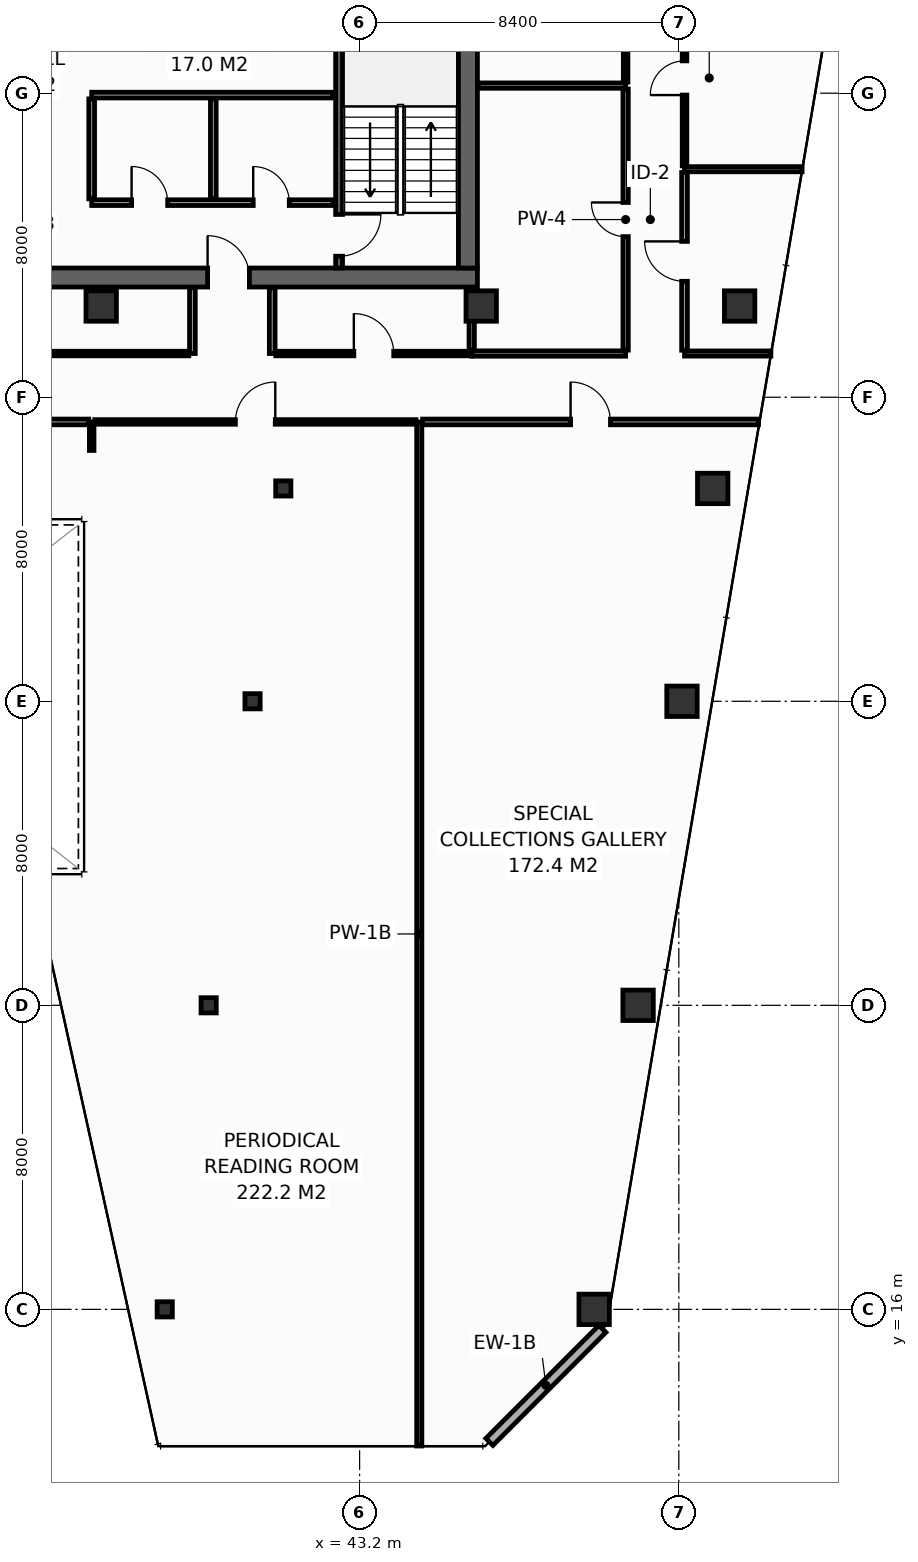
"""IFC4 building model, lengths in metres.
Left out: names, types, materials, properties, quantities, classifications, styles, units other than length and angle.
Written with IfcOpenShell. Run it as: python <this file> out.ifc"""

import sys

from ifc_helpers import new_model, si_unit, direction, frame, frame_2d, origin, origin_2d, place, context, subcontext, project, spatial, rectangle, hollow_rectangle, extrude, element, fill, save


model = new_model("IFC4")
c1 = context("Model", 3, precision=1e-05, world=origin(), true_north=direction((0.0, 1.0)))
c2 = subcontext(c1, "Body", "Model", "MODEL_VIEW")
j1 = project(units=[si_unit("LENGTHUNIT", "METRE"), si_unit("PLANEANGLEUNIT", "RADIAN")], contexts=[c1])
p1 = place(None, origin())
s1 = spatial("IfcSite", under=j1, at=p1, CompositionType="ELEMENT")
p2 = place(p1, origin())
s2 = spatial("IfcBuilding", under=s1, at=p2, CompositionType="ELEMENT")
p3 = place(p2, frame((0.0, 0.0, 194.2)))
s3 = spatial("IfcBuildingStorey", under=s2, at=p3, CompositionType="ELEMENT", Elevation=194.2)
p4 = place(p3, frame((13.6, 43.15, 0.0), z_axis=(0.0, 0.0, 1.0), x_axis=(1.0, 0.0, 0.0)))
e1 = element("IfcWall", 1, at=p4, inside=s3, PredefinedType="SHEAR", context=c2, shape_type="SweptSolid", body=[
    extrude(rectangle(XDim=32.7, YDim=0.5, at=frame_2d((16.35, 0.0))), origin(), (0.0, 0.0, 1.0), 3.55),
])
p5 = place(p4, frame((5.4, 0.0, 0.0)))
e2 = element("IfcOpeningElement", 2, at=p5, cuts=e1, PredefinedType="OPENING", context=c2, shape_type="SweptSolid", body=[
    extrude(rectangle(XDim=1.1, YDim=2.15, at=frame_2d((0.55, 1.075))), frame((0.0, 0.26, 0.0), z_axis=(0.0, -1.0, 0.0), x_axis=(1.0, 0.0, 0.0)), (0.0, 0.0, 1.0), 0.52),
])
p6 = place(p4, frame((25.6, 0.0, 0.0)))
e3 = element("IfcOpeningElement", 3, at=p6, cuts=e1, PredefinedType="OPENING", context=c2, shape_type="SweptSolid", body=[
    extrude(rectangle(XDim=1.1, YDim=2.15, at=frame_2d((0.55, 1.075))), frame((0.0, 0.26, 0.0), z_axis=(0.0, -1.0, 0.0), x_axis=(1.0, 0.0, 0.0)), (0.0, 0.0, 1.0), 0.52),
])
p7 = place(p3, frame((46.05, 43.4, 0.0), z_axis=(0.0, 0.0, 1.0), x_axis=(0.0, 1.0, 0.0)))
e4 = element("IfcWall", 4, at=p7, inside=s3, PredefinedType="SHEAR", context=c2, shape_type="SweptSolid", body=[
    extrude(rectangle(XDim=10.4, YDim=0.5, at=frame_2d((5.2, 0.0))), origin(), (0.0, 0.0, 1.0), 3.55),
])
for number, where, z_axis, x_axis in (
    (5, (36.4, 42.4, 0.0), (0.0, 0.0, 1.0), (1.0, 0.0, 0.0)),
    (6, (46.4, 42.4, 0.0), (0.0, 0.0, 1.0), (1.0, 0.0, 0.0)),
    (7, (53.2, 42.4, 0.0), (0.0, 0.0, 1.0), (1.0, 0.0, 0.0)),
    (8, (49.372, 16.0, 0.0), (0.0, 0.0, 1.0), (1.0, 0.0, 0.0)),
):
    element("IfcColumn", number, at=place(p3, frame(where, z_axis=z_axis, x_axis=x_axis)), inside=s3, PredefinedType="COLUMN", context=c2, shape_type="SweptSolid", body=[
        extrude(hollow_rectangle(XDim=0.8, YDim=0.8, WallThickness=0.036, at=origin_2d()), origin(), (0.0, 0.0, 1.0), 3.8),
    ])
p8 = place(p3, frame((38.072, 16.0, 0.0), z_axis=(0.0, 0.0, 1.0), x_axis=(1.0, 0.0, 0.0)))
e9 = element("IfcColumn", 9, at=p8, inside=s3, PredefinedType="COLUMN", context=c2, shape_type="SweptSolid", body=[
    extrude(hollow_rectangle(XDim=0.4, YDim=0.4, WallThickness=0.016, at=origin_2d()), origin(), (0.0, 0.0, 1.0), 3.8),
])
p9 = place(p3, frame((50.528, 24.0, 0.0), z_axis=(0.0, 0.0, 1.0), x_axis=(1.0, 0.0, 0.0)))
e10 = element("IfcColumn", 10, at=p9, inside=s3, PredefinedType="COLUMN", context=c2, shape_type="SweptSolid", body=[
    extrude(hollow_rectangle(XDim=0.8, YDim=0.8, WallThickness=0.036, at=origin_2d()), origin(), (0.0, 0.0, 1.0), 3.8),
])
p10 = place(p3, frame((39.228, 24.0, 0.0), z_axis=(0.0, 0.0, 1.0), x_axis=(1.0, 0.0, 0.0)))
e11 = element("IfcColumn", 11, at=p10, inside=s3, PredefinedType="COLUMN", context=c2, shape_type="SweptSolid", body=[
    extrude(hollow_rectangle(XDim=0.4, YDim=0.4, WallThickness=0.016, at=origin_2d()), origin(), (0.0, 0.0, 1.0), 3.8),
])
p11 = place(p3, frame((51.683, 32.0, 0.0), z_axis=(0.0, 0.0, 1.0), x_axis=(1.0, 0.0, 0.0)))
e12 = element("IfcColumn", 12, at=p11, inside=s3, PredefinedType="COLUMN", context=c2, shape_type="SweptSolid", body=[
    extrude(hollow_rectangle(XDim=0.8, YDim=0.8, WallThickness=0.036, at=origin_2d()), origin(), (0.0, 0.0, 1.0), 3.8),
])
p12 = place(p3, frame((40.383, 32.0, 0.0), z_axis=(0.0, 0.0, 1.0), x_axis=(1.0, 0.0, 0.0)))
e13 = element("IfcColumn", 13, at=p12, inside=s3, PredefinedType="COLUMN", context=c2, shape_type="SweptSolid", body=[
    extrude(hollow_rectangle(XDim=0.4, YDim=0.4, WallThickness=0.016, at=origin_2d()), origin(), (0.0, 0.0, 1.0), 3.8),
])
p13 = place(p3, frame((52.492, 37.6, 0.0), z_axis=(0.0, 0.0, 1.0), x_axis=(1.0, 0.0, 0.0)))
e14 = element("IfcColumn", 14, at=p13, inside=s3, PredefinedType="COLUMN", context=c2, shape_type="SweptSolid", body=[
    extrude(hollow_rectangle(XDim=0.8, YDim=0.8, WallThickness=0.036, at=origin_2d()), origin(), (0.0, 0.0, 1.0), 3.8),
])
p14 = place(p3, frame((41.192, 37.6, 0.0), z_axis=(0.0, 0.0, 1.0), x_axis=(1.0, 0.0, 0.0)))
e15 = element("IfcColumn", 15, at=p14, inside=s3, PredefinedType="COLUMN", context=c2, shape_type="SweptSolid", body=[
    extrude(hollow_rectangle(XDim=0.4, YDim=0.4, WallThickness=0.016, at=origin_2d()), origin(), (0.0, 0.0, 1.0), 3.8),
])
p15 = place(p3, frame((42.66, 53.8, 0.0), z_axis=(0.0, 0.0, 1.0), x_axis=(0.0, -1.0, 0.0)))
e16 = element("IfcWall", 16, at=p15, inside=s3, PredefinedType="SHEAR", context=c2, shape_type="SweptSolid", body=[
    extrude(rectangle(XDim=10.4, YDim=0.18, at=frame_2d((5.2, 0.0))), origin(), (0.0, 0.0, 1.0), 3.55),
])
p16 = place(p15, frame((8.99, 0.0, 0.0)))
e17 = element("IfcOpeningElement", 17, at=p16, cuts=e16, PredefinedType="OPENING", context=c2, shape_type="SweptSolid", body=[
    extrude(rectangle(XDim=1.1, YDim=2.15, at=frame_2d((0.55, 1.075))), frame((0.0, 0.1, 0.0), z_axis=(0.0, -1.0, 0.0), x_axis=(1.0, 0.0, 0.0)), (0.0, 0.0, 1.0), 0.2),
])
p17 = place(p3, frame((36.15, 45.12, 0.0), z_axis=(0.0, 0.0, 1.0), x_axis=(1.0, 0.0, 0.0)))
e18 = element("IfcWall", 18, at=p17, inside=s3, PredefinedType="PARTITIONING", context=c2, shape_type="SweptSolid", body=[
    extrude(rectangle(XDim=6.35, YDim=0.15, at=frame_2d((3.175, 0.0))), origin(), (0.0, 0.0, 1.0), 3.55),
])
p18 = place(p17, frame((1.05, 0.0, 0.0)))
e19 = element("IfcOpeningElement", 19, at=p18, cuts=e18, PredefinedType="OPENING", context=c2, shape_type="SweptSolid", body=[
    extrude(rectangle(XDim=0.95, YDim=2.15, at=frame_2d((0.475, 1.075))), frame((0.0, 0.085, 0.0), z_axis=(0.0, -1.0, 0.0), x_axis=(1.0, 0.0, 0.0)), (0.0, 0.0, 1.0), 0.17),
])
p19 = place(p17, frame((4.25, 0.0, 0.0)))
e20 = element("IfcOpeningElement", 20, at=p19, cuts=e18, PredefinedType="OPENING", context=c2, shape_type="SweptSolid", body=[
    extrude(rectangle(XDim=0.95, YDim=2.15, at=frame_2d((0.475, 1.075))), frame((0.0, 0.085, 0.0), z_axis=(0.0, -1.0, 0.0), x_axis=(1.0, 0.0, 0.0)), (0.0, 0.0, 1.0), 0.17),
])
p20 = place(p3, frame((36.15, 47.95, 0.0), z_axis=(0.0, 0.0, 1.0), x_axis=(1.0, 0.0, 0.0)))
e21 = element("IfcWall", 21, at=p20, inside=s3, PredefinedType="PARTITIONING", context=c2, shape_type="SweptSolid", body=[
    extrude(rectangle(XDim=6.35, YDim=0.15, at=frame_2d((3.175, 0.0))), origin(), (0.0, 0.0, 1.0), 3.55),
])
for number, where, z_axis, x_axis in (
    (22, (36.15, 45.22, 0.0), (0.0, 0.0, 1.0), (0.0, 1.0, 0.0)),
    (23, (39.35, 45.22, 0.0), (0.0, 0.0, 1.0), (0.0, 1.0, 0.0)),
):
    element("IfcWall", number, at=place(p3, frame(where, z_axis=z_axis, x_axis=x_axis)), inside=s3, PredefinedType="PARTITIONING", context=c2, shape_type="SweptSolid", body=[
        extrude(rectangle(XDim=2.63, YDim=0.15, at=frame_2d((1.315, 0.0))), origin(), (0.0, 0.0, 1.0), 3.55),
    ])
p21 = place(p3, frame((46.615, 12.513, 0.0), z_axis=(0.0, 0.0, 1.0), x_axis=(0.707135806771, 0.70707775441, 0.0)))
e24 = element("IfcWall", 24, at=p21, inside=s3, PredefinedType="STANDARD", context=c2, shape_type="SweptSolid", body=[
    extrude(rectangle(XDim=4.206, YDim=0.26, at=frame_2d((2.103, 0.0))), origin(), (0.0, 0.0, 1.0), 3.55),
])
p22 = place(p3, frame((46.15, 41.15, 0.0), z_axis=(0.0, 0.0, 1.0), x_axis=(1.0, 0.0, 0.0)))
e25 = element("IfcWall", 25, at=p22, inside=s3, PredefinedType="PARTITIONING", context=c2, shape_type="SweptSolid", body=[
    extrude(rectangle(XDim=4.05, YDim=0.14, at=frame_2d((2.025, 0.0))), origin(), (0.0, 0.0, 1.0), 3.55),
])
p23 = place(p3, frame((46.15, 41.24, 0.0), z_axis=(0.0, 0.0, 1.0), x_axis=(0.0, 1.0, 0.0)))
e26 = element("IfcWall", 26, at=p23, inside=s3, PredefinedType="PARTITIONING", context=c2, shape_type="SweptSolid", body=[
    extrude(rectangle(XDim=1.64, YDim=0.14, at=frame_2d((0.82, 0.0))), origin(), (0.0, 0.0, 1.0), 3.55),
])
p24 = place(p3, frame((46.32, 48.2, 0.0), z_axis=(0.0, 0.0, 1.0), x_axis=(1.0, 0.0, 0.0)))
e27 = element("IfcWall", 27, at=p24, inside=s3, PredefinedType="PARTITIONING", context=c2, shape_type="SweptSolid", body=[
    extrude(rectangle(XDim=3.88, YDim=0.14, at=frame_2d((1.94, 0.0))), origin(), (0.0, 0.0, 1.0), 3.55),
])
p25 = place(p3, frame((50.2, 41.24, 0.0), z_axis=(0.0, 0.0, 1.0), x_axis=(0.0, 1.0, 0.0)))
e28 = element("IfcWall", 28, at=p25, inside=s3, PredefinedType="PARTITIONING", context=c2, shape_type="SweptSolid", body=[
    extrude(rectangle(XDim=6.87, YDim=0.14, at=frame_2d((3.435, 0.0))), origin(), (0.0, 0.0, 1.0), 2.835),
])
p26 = place(p25, frame((2.985, 0.0, 0.0)))
e29 = element("IfcOpeningElement", 29, at=p26, cuts=e28, PredefinedType="OPENING", context=c2, shape_type="SweptSolid", body=[
    extrude(rectangle(XDim=0.9, YDim=2.1, at=frame_2d((0.45, 1.05))), frame((0.0, 0.08, 0.0), z_axis=(0.0, -1.0, 0.0), x_axis=(1.0, 0.0, 0.0)), (0.0, 0.0, 1.0), 0.16),
])
p27 = place(p3, frame((50.2, 48.29, 0.0), z_axis=(0.0, 0.0, 1.0), x_axis=(0.0, 1.0, 0.0)))
e30 = element("IfcWall", 30, at=p27, inside=s3, PredefinedType="PARTITIONING", context=c2, shape_type="SweptSolid", body=[
    extrude(rectangle(XDim=3.98, YDim=0.12, at=frame_2d((1.99, 0.0))), origin(), (0.0, 0.0, 1.0), 3.55),
])
p28 = place(p27, frame((1.465, 0.0, 0.0)))
e31 = element("IfcOpeningElement", 31, at=p28, cuts=e30, PredefinedType="OPENING", context=c2, shape_type="SweptSolid", body=[
    extrude(rectangle(XDim=1.05, YDim=2.15, at=frame_2d((0.525, 1.075))), frame((0.0, 0.07, 0.0), z_axis=(0.0, -1.0, 0.0), x_axis=(1.0, 0.0, 0.0)), (0.0, 0.0, 1.0), 0.14),
])
p29 = place(p3, frame((51.75, 41.15, 0.0), z_axis=(0.0, 0.0, 1.0), x_axis=(1.0, 0.0, 0.0)))
e32 = element("IfcWall", 32, at=p29, inside=s3, PredefinedType="PARTITIONING", context=c2, shape_type="SweptSolid", body=[
    extrude(rectangle(XDim=2.273, YDim=0.135, at=frame_2d((1.136, 0.0))), origin(), (0.0, 0.0, 1.0), 3.035),
])
p30 = place(p3, frame((51.75, 46.0, 0.0), z_axis=(0.0, 0.0, 1.0), x_axis=(1.0, 0.0, 0.0)))
e33 = element("IfcWall", 33, at=p30, inside=s3, PredefinedType="PARTITIONING", context=c2, shape_type="SweptSolid", body=[
    extrude(rectangle(XDim=3.094, YDim=0.135, at=frame_2d((1.547, 0.0))), origin(), (0.0, 0.0, 1.0), 2.835),
])
p31 = place(p3, frame((51.75, 41.238, 0.0), z_axis=(0.0, 0.0, 1.0), x_axis=(0.0, 1.0, 0.0)))
e34 = element("IfcWall", 34, at=p31, inside=s3, PredefinedType="PARTITIONING", context=c2, shape_type="SweptSolid", body=[
    extrude(rectangle(XDim=4.675, YDim=0.15, at=frame_2d((2.337, 0.0))), origin(), (0.0, 0.0, 1.0), 2.835),
])
p32 = place(p31, frame((1.813, 0.0, 0.0)))
e35 = element("IfcOpeningElement", 35, at=p32, cuts=e34, PredefinedType="OPENING", context=c2, shape_type="SweptSolid", body=[
    extrude(rectangle(XDim=1.05, YDim=2.15, at=frame_2d((0.525, 1.075))), frame((0.0, 0.085, 0.0), z_axis=(0.0, -1.0, 0.0), x_axis=(1.0, 0.0, 0.0)), (0.0, 0.0, 1.0), 0.17),
])
p33 = place(p3, frame((51.75, 46.087, 0.0), z_axis=(0.0, 0.0, 1.0), x_axis=(0.0, 1.0, 0.0)))
e36 = element("IfcWall", 36, at=p33, inside=s3, PredefinedType="PARTITIONING", context=c2, shape_type="SweptSolid", body=[
    extrude(rectangle(XDim=4.625, YDim=0.12, at=frame_2d((2.312, 0.0))), origin(), (0.0, 0.0, 1.0), 3.55),
])
p34 = place(p33, frame((1.863, 0.0, 0.0)))
e37 = element("IfcOpeningElement", 37, at=p34, cuts=e36, PredefinedType="OPENING", context=c2, shape_type="SweptSolid", body=[
    extrude(rectangle(XDim=0.9, YDim=2.1, at=frame_2d((0.45, 1.05))), frame((0.0, 0.07, 0.0), z_axis=(0.0, -1.0, 0.0), x_axis=(1.0, 0.0, 0.0)), (0.0, 0.0, 1.0), 0.14),
])
for number, where, z_axis, x_axis in (
    (38, (38.8, 41.15, 0.0), (0.0, 0.0, 1.0), (0.0, 1.0, 0.0)),
    (39, (40.9, 41.15, 0.0), (0.0, 0.0, 1.0), (0.0, 1.0, 0.0)),
):
    element("IfcWall", number, at=place(p3, frame(where, z_axis=z_axis, x_axis=x_axis)), inside=s3, PredefinedType="PARTITIONING", context=c2, shape_type="SweptSolid", body=[
        extrude(rectangle(XDim=1.73, YDim=0.15, at=frame_2d((0.865, 0.0))), origin(), (0.0, 0.0, 1.0), 3.55),
    ])
p35 = place(p3, frame((20.795, 41.15, 0.0), z_axis=(0.0, 0.0, 1.0), x_axis=(1.0, 0.0, 0.0)))
e40 = element("IfcWall", 40, at=p35, inside=s3, PredefinedType="PARTITIONING", context=c2, shape_type="SweptSolid", body=[
    extrude(rectangle(XDim=17.91, YDim=0.12, at=frame_2d((8.955, 0.0))), origin(), (0.0, 0.0, 1.0), 2.835),
])
p36 = place(p35, frame((8.43, 0.0, 0.0)))
e41 = element("IfcOpeningElement", 41, at=p36, cuts=e40, PredefinedType="OPENING", context=c2, shape_type="SweptSolid", body=[
    extrude(rectangle(XDim=1.05, YDim=2.15, at=frame_2d((0.525, 1.075))), frame((0.0, 0.07, 0.0), z_axis=(0.0, -1.0, 0.0), x_axis=(1.0, 0.0, 0.0)), (0.0, 0.0, 1.0), 0.14),
])
p37 = place(p3, frame((40.995, 41.15, 0.0), z_axis=(0.0, 0.0, 1.0), x_axis=(1.0, 0.0, 0.0)))
e42 = element("IfcWall", 42, at=p37, inside=s3, PredefinedType="PARTITIONING", context=c2, shape_type="SweptSolid", body=[
    extrude(rectangle(XDim=5.155, YDim=0.12, at=frame_2d((2.577, 0.0))), origin(), (0.0, 0.0, 1.0), 3.55),
])
p38 = place(p37, frame((2.053, 0.0, 0.0)))
e43 = element("IfcOpeningElement", 43, at=p38, cuts=e42, PredefinedType="OPENING", context=c2, shape_type="SweptSolid", body=[
    extrude(rectangle(XDim=1.05, YDim=2.15, at=frame_2d((0.525, 1.075))), frame((0.0, 0.07, 0.0), z_axis=(0.0, -1.0, 0.0), x_axis=(1.0, 0.0, 0.0)), (0.0, 0.0, 1.0), 0.14),
])
p39 = place(p3, frame((44.77, 12.405, 0.0), z_axis=(0.0, 0.0, 1.0), x_axis=(0.0, 1.0, 0.0)))
e44 = element("IfcWall", 44, at=p39, inside=s3, PredefinedType="PARTITIONING", context=c2, shape_type="SweptSolid", body=[
    extrude(rectangle(XDim=26.945, YDim=0.135, at=frame_2d((13.473, 0.0))), origin(), (0.0, 0.0, 1.0), 2.835),
])
p40 = place(p3, frame((36.15, 38.6, 0.0), z_axis=(0.0, 0.0, 1.0), x_axis=(0.0, 1.0, 0.0)))
e45 = element("IfcWall", 45, at=p40, inside=s3, PredefinedType="PARTITIONING", context=c2, shape_type="SweptSolid", body=[
    extrude(rectangle(XDim=0.75, YDim=0.12, at=frame_2d((0.375, 0.0))), origin(), (0.0, 0.0, 1.0), 3.55),
])
p41 = place(p3, frame((23.93, 39.35, 0.0), z_axis=(0.0, 0.0, 1.0), x_axis=(1.0, 0.0, 0.0)))
e46 = element("IfcWall", 46, at=p41, inside=s3, PredefinedType="PARTITIONING", context=c2, shape_type="SweptSolid", body=[
    extrude(rectangle(XDim=12.14, YDim=0.15, at=frame_2d((6.07, 0.0))), origin(), (0.0, 0.0, 1.0), 3.55),
])
p42 = place(p3, frame((36.23, 39.35, 0.0), z_axis=(0.0, 0.0, 1.0), x_axis=(1.0, 0.0, 0.0)))
e47 = element("IfcWall", 47, at=p42, inside=s3, PredefinedType="PARTITIONING", context=c2, shape_type="SweptSolid", body=[
    extrude(rectangle(XDim=8.453, YDim=0.12, at=frame_2d((4.226, 0.0))), origin(), (0.0, 0.0, 1.0), 2.835),
])
p43 = place(p42, frame((3.701, 0.0, 0.0)))
e48 = element("IfcOpeningElement", 48, at=p43, cuts=e47, PredefinedType="OPENING", context=c2, shape_type="SweptSolid", body=[
    extrude(rectangle(XDim=1.05, YDim=2.15, at=frame_2d((0.525, 1.075))), frame((0.0, 0.07, 0.0), z_axis=(0.0, -1.0, 0.0), x_axis=(1.0, 0.0, 0.0)), (0.0, 0.0, 1.0), 0.14),
])
p44 = place(p3, frame((44.857, 39.35, 0.0), z_axis=(0.0, 0.0, 1.0), x_axis=(1.0, 0.0, 0.0)))
e49 = element("IfcWall", 49, at=p44, inside=s3, PredefinedType="PARTITIONING", context=c2, shape_type="SweptSolid", body=[
    extrude(rectangle(XDim=8.838, YDim=0.15, at=frame_2d((4.419, 0.0))), origin(), (0.0, 0.0, 1.0), 3.035),
])
p45 = place(p44, frame((3.894, 0.0, 0.0)))
e50 = element("IfcOpeningElement", 50, at=p45, cuts=e49, PredefinedType="OPENING", context=c2, shape_type="SweptSolid", body=[
    extrude(rectangle(XDim=1.05, YDim=2.15, at=frame_2d((0.525, 1.075))), frame((0.0, 0.085, 0.0), z_axis=(0.0, -1.0, 0.0), x_axis=(1.0, 0.0, 0.0)), (0.0, 0.0, 1.0), 0.17),
])
p46 = place(p16, origin())
e51 = element("IfcDoor", 51, at=p46, inside=s3, OperationType="SINGLE_SWING_LEFT", PredefinedType="DOOR", context=c2, shape_type="SweptSolid", body=[
    extrude(rectangle(XDim=1.1, YDim=2.15, at=frame_2d((0.55, 1.075))), frame((0.0, 0.025, 0.0), z_axis=(0.0, -1.0, 0.0), x_axis=(1.0, 0.0, 0.0)), (0.0, 0.0, 1.0), 0.05),
])
fill(e17, e51)
p47 = place(p6, origin())
e52 = element("IfcDoor", 52, at=p47, inside=s3, OperationType="SINGLE_SWING_LEFT", PredefinedType="DOOR", context=c2, shape_type="SweptSolid", body=[
    extrude(rectangle(XDim=1.1, YDim=2.15, at=frame_2d((0.55, 1.075))), frame((0.0, 0.025, 0.0), z_axis=(0.0, -1.0, 0.0), x_axis=(1.0, 0.0, 0.0)), (0.0, 0.0, 1.0), 0.05),
])
fill(e3, e52)
p48 = place(p18, origin())
e53 = element("IfcDoor", 53, at=p48, inside=s3, OperationType="SINGLE_SWING_LEFT", PredefinedType="DOOR", context=c2, shape_type="SweptSolid", body=[
    extrude(rectangle(XDim=0.95, YDim=2.15, at=frame_2d((0.475, 1.075))), frame((0.0, 0.025, 0.0), z_axis=(0.0, -1.0, 0.0), x_axis=(1.0, 0.0, 0.0)), (0.0, 0.0, 1.0), 0.05),
])
fill(e19, e53)
p49 = place(p19, origin())
e54 = element("IfcDoor", 54, at=p49, inside=s3, OperationType="SINGLE_SWING_LEFT", PredefinedType="DOOR", context=c2, shape_type="SweptSolid", body=[
    extrude(rectangle(XDim=0.95, YDim=2.15, at=frame_2d((0.475, 1.075))), frame((0.0, 0.025, 0.0), z_axis=(0.0, -1.0, 0.0), x_axis=(1.0, 0.0, 0.0)), (0.0, 0.0, 1.0), 0.05),
])
fill(e20, e54)
p50 = place(p26, origin())
e55 = element("IfcDoor", 55, at=p50, inside=s3, OperationType="SINGLE_SWING_RIGHT", PredefinedType="DOOR", context=c2, shape_type="SweptSolid", body=[
    extrude(rectangle(XDim=0.9, YDim=2.1, at=frame_2d((0.45, 1.05))), frame((0.0, 0.025, 0.0), z_axis=(0.0, -1.0, 0.0), x_axis=(1.0, 0.0, 0.0)), (0.0, 0.0, 1.0), 0.05),
])
fill(e29, e55)
p51 = place(p32, origin())
e56 = element("IfcDoor", 56, at=p51, inside=s3, OperationType="SINGLE_SWING_RIGHT", PredefinedType="DOOR", context=c2, shape_type="SweptSolid", body=[
    extrude(rectangle(XDim=1.05, YDim=2.15, at=frame_2d((0.525, 1.075))), frame((0.0, 0.025, 0.0), z_axis=(0.0, -1.0, 0.0), x_axis=(1.0, 0.0, 0.0)), (0.0, 0.0, 1.0), 0.05),
])
fill(e35, e56)
p52 = place(p34, origin())
e57 = element("IfcDoor", 57, at=p52, inside=s3, OperationType="SINGLE_SWING_LEFT", PredefinedType="DOOR", context=c2, shape_type="SweptSolid", body=[
    extrude(rectangle(XDim=0.9, YDim=2.1, at=frame_2d((0.45, 1.05))), frame((0.0, 0.025, 0.0), z_axis=(0.0, -1.0, 0.0), x_axis=(1.0, 0.0, 0.0)), (0.0, 0.0, 1.0), 0.05),
])
fill(e37, e57)
p53 = place(p38, origin())
e58 = element("IfcDoor", 58, at=p53, inside=s3, OperationType="SINGLE_SWING_LEFT", PredefinedType="DOOR", context=c2, shape_type="SweptSolid", body=[
    extrude(rectangle(XDim=1.05, YDim=2.15, at=frame_2d((0.525, 1.075))), frame((0.0, 0.025, 0.0), z_axis=(0.0, -1.0, 0.0), x_axis=(1.0, 0.0, 0.0)), (0.0, 0.0, 1.0), 0.05),
])
fill(e43, e58)
p54 = place(p43, origin())
e59 = element("IfcDoor", 59, at=p54, inside=s3, OperationType="SINGLE_SWING_RIGHT", PredefinedType="DOOR", context=c2, shape_type="SweptSolid", body=[
    extrude(rectangle(XDim=1.05, YDim=2.15, at=frame_2d((0.525, 1.075))), frame((0.0, 0.025, 0.0), z_axis=(0.0, -1.0, 0.0), x_axis=(1.0, 0.0, 0.0)), (0.0, 0.0, 1.0), 0.05),
])
fill(e48, e59)
p55 = place(p45, origin())
e60 = element("IfcDoor", 60, at=p55, inside=s3, OperationType="SINGLE_SWING_LEFT", PredefinedType="DOOR", context=c2, shape_type="SweptSolid", body=[
    extrude(rectangle(XDim=1.05, YDim=2.15, at=frame_2d((0.525, 1.075))), frame((0.0, 0.025, 0.0), z_axis=(0.0, -1.0, 0.0), x_axis=(1.0, 0.0, 0.0)), (0.0, 0.0, 1.0), 0.05),
])
fill(e50, e60)
save(model, sys.argv[1])
